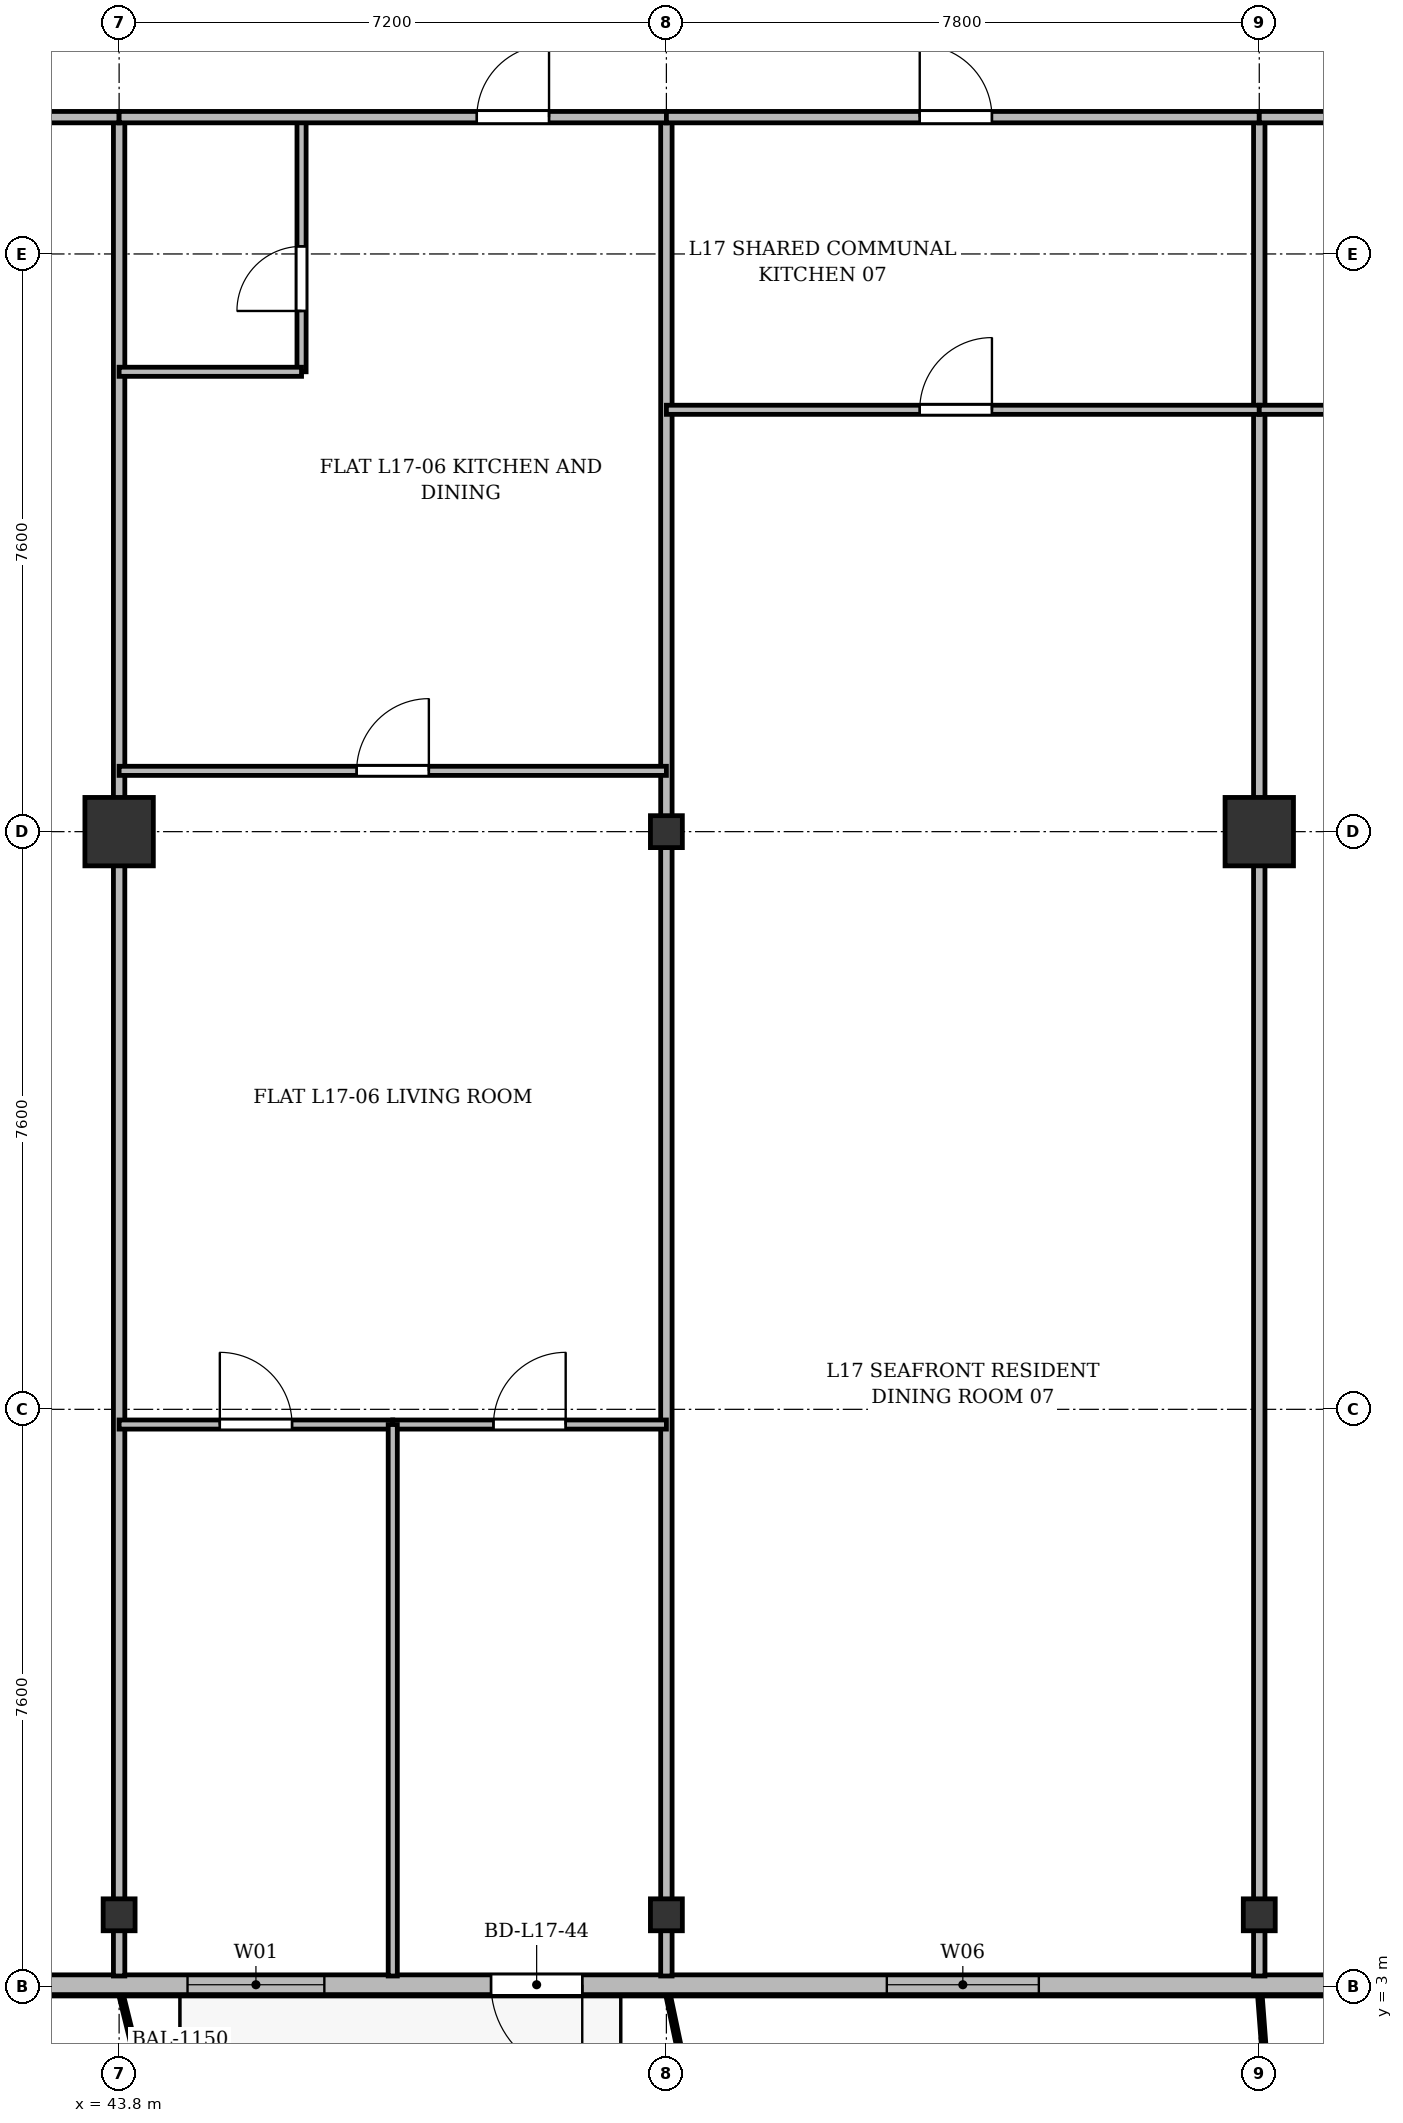
"""IFC4 building model, lengths in metres.
Left out: names, types, materials, properties, quantities, classifications, styles, units other than length and angle.
Written with IfcOpenShell. Run it as: python <this file> out.ifc"""

import sys

from ifc_helpers import new_model, si_unit, direction, frame, frame_2d, origin, origin_2d, place, context, subcontext, project, spatial, rectangle, i_section, extrude, source, transform, mapped, element, fill, save


model = new_model("IFC4")
c1 = context("Model", 3, precision=1e-05, world=origin(), true_north=direction((0.0, 1.0)))
c2 = subcontext(c1, "Body", "Model", "MODEL_VIEW")
j1 = project(units=[si_unit("LENGTHUNIT", "METRE"), si_unit("PLANEANGLEUNIT", "RADIAN")], contexts=[c1])
p1 = place(None, origin())
s1 = spatial("IfcSite", under=j1, at=p1, CompositionType="ELEMENT")
p2 = place(p1, origin())
s2 = spatial("IfcBuilding", under=s1, at=p2, CompositionType="ELEMENT")
p3 = place(p2, frame((0.0, 0.0, 66.7)))
s3 = spatial("IfcBuildingStorey", under=s2, at=p3, CompositionType="ELEMENT", Elevation=66.7)
m1 = source(origin(), c2, "Body", "SweptSolid", [
    extrude(i_section(OverallWidth=0.42, OverallDepth=0.42, WebThickness=0.026, FlangeThickness=0.04, at=origin_2d()), origin(), (0.0, 0.0, 1.0), 3.6),
])
p4 = place(p3, frame((43.8, 3.95, 0.0), z_axis=(0.0, 0.0, 1.0), x_axis=(1.0, 0.0, 0.0)))
e1 = element("IfcColumn", 1, at=p4, inside=s3, PredefinedType="COLUMN", context=c2, shape_type="MappedRepresentation", body=[
    mapped(m1, transform((0.0, 0.0, 0.0), x_axis=(1.0, 0.0, 0.0), y_axis=(0.0, 1.0, 0.0), z_axis=(0.0, 0.0, 1.0), scale=1.0)),
])
m2 = source(origin(), c2, "Body", "SweptSolid", [
    extrude(rectangle(XDim=0.9, YDim=0.9, at=origin_2d()), origin(), (0.0, 0.0, 1.0), 3.6),
])
p5 = place(p3, frame((43.8, 18.2, 0.0), z_axis=(0.0, 0.0, 1.0), x_axis=(1.0, 0.0, 0.0)))
e2 = element("IfcColumn", 2, at=p5, inside=s3, PredefinedType="COLUMN", context=c2, shape_type="MappedRepresentation", body=[
    mapped(m2, transform((0.0, 0.0, 0.0), x_axis=(1.0, 0.0, 0.0), y_axis=(0.0, 1.0, 0.0), z_axis=(0.0, 0.0, 1.0), scale=1.0)),
])
for number, where, z_axis, x_axis in (
    (3, (51.0, 3.95, 0.0), (0.0, 0.0, 1.0), (1.0, 0.0, 0.0)),
    (4, (51.0, 18.2, 0.0), (0.0, 0.0, 1.0), (1.0, 0.0, 0.0)),
    (5, (58.8, 3.95, 0.0), (0.0, 0.0, 1.0), (1.0, 0.0, 0.0)),
):
    element("IfcColumn", number, at=place(p3, frame(where, z_axis=z_axis, x_axis=x_axis)), inside=s3, PredefinedType="COLUMN", context=c2, shape_type="MappedRepresentation", body=[
        mapped(m1, transform((0.0, 0.0, 0.0), x_axis=(1.0, 0.0, 0.0), y_axis=(0.0, 1.0, 0.0), z_axis=(0.0, 0.0, 1.0), scale=1.0)),
    ])
p6 = place(p3, frame((58.8, 18.2, 0.0), z_axis=(0.0, 0.0, 1.0), x_axis=(1.0, 0.0, 0.0)))
e6 = element("IfcColumn", 6, at=p6, inside=s3, PredefinedType="COLUMN", context=c2, shape_type="MappedRepresentation", body=[
    mapped(m2, transform((0.0, 0.0, 0.0), x_axis=(1.0, 0.0, 0.0), y_axis=(0.0, 1.0, 0.0), z_axis=(0.0, 0.0, 1.0), scale=1.0)),
])
p7 = place(p3, frame((66.9, 3.03, 0.0), z_axis=(0.0, 0.0, 1.0), x_axis=(-1.0, 0.0, 0.0)))
e7 = element("IfcWall", 7, at=p7, inside=s3, PredefinedType="SOLIDWALL", context=c2, shape_type="SweptSolid", body=[
    extrude(rectangle(XDim=37.3, YDim=0.26, at=frame_2d((18.65, 0.0))), origin(), (0.0, 0.0, 1.0), 3.34),
])
p8 = place(p7, frame((3.345, 0.0, 0.9)))
e8 = element("IfcOpeningElement", 8, at=p8, cuts=e7, PredefinedType="OPENING", context=c2, shape_type="SweptSolid", body=[
    extrude(rectangle(XDim=1.5, YDim=1.75, at=frame_2d((0.75, 0.875))), frame((0.0, 0.14, 0.0), z_axis=(0.0, -1.0, 0.0), x_axis=(1.0, 0.0, 0.0)), (0.0, 0.0, 1.0), 0.28),
])
p9 = place(p7, frame((11.0, 0.0, 0.9)))
e9 = element("IfcOpeningElement", 9, at=p9, cuts=e7, PredefinedType="OPENING", context=c2, shape_type="SweptSolid", body=[
    extrude(rectangle(XDim=2.0, YDim=1.95, at=frame_2d((1.0, 0.975))), frame((0.0, 0.14, 0.0), z_axis=(0.0, -1.0, 0.0), x_axis=(1.0, 0.0, 0.0)), (0.0, 0.0, 1.0), 0.28),
])
p10 = place(p7, frame((17.007, 0.0, 0.0)))
e10 = element("IfcOpeningElement", 10, at=p10, cuts=e7, PredefinedType="OPENING", context=c2, shape_type="SweptSolid", body=[
    extrude(rectangle(XDim=1.2, YDim=2.2, at=frame_2d((0.6, 1.1))), frame((0.0, 0.14, 0.0), z_axis=(0.0, -1.0, 0.0), x_axis=(1.0, 0.0, 0.0)), (0.0, 0.0, 1.0), 0.28),
])
p11 = place(p7, frame((20.4, 0.0, 0.9)))
e11 = element("IfcOpeningElement", 11, at=p11, cuts=e7, PredefinedType="OPENING", context=c2, shape_type="SweptSolid", body=[
    extrude(rectangle(XDim=1.8, YDim=1.8, at=frame_2d((0.9, 0.9))), frame((0.0, 0.14, 0.0), z_axis=(0.0, -1.0, 0.0), x_axis=(1.0, 0.0, 0.0)), (0.0, 0.0, 1.0), 0.28),
])
p12 = place(p7, frame((28.6, 0.0, 0.9)))
e12 = element("IfcOpeningElement", 12, at=p12, cuts=e7, PredefinedType="OPENING", context=c2, shape_type="SweptSolid", body=[
    extrude(rectangle(XDim=2.2, YDim=1.8, at=frame_2d((1.1, 0.9))), frame((0.0, 0.14, 0.0), z_axis=(0.0, -1.0, 0.0), x_axis=(1.0, 0.0, 0.0)), (0.0, 0.0, 1.0), 0.28),
])
for number, where, z_axis, x_axis in (
    (13, (43.8, 3.145, 0.0), (0.0, 0.0, 1.0), (0.0, 1.0, 0.0)),
    (14, (51.0, 3.145, 0.0), (0.0, 0.0, 1.0), (0.0, 1.0, 0.0)),
    (15, (58.8, 3.145, 0.0), (0.0, 0.0, 1.0), (0.0, 1.0, 0.0)),
):
    element("IfcWall", number, at=place(p3, frame(where, z_axis=z_axis, x_axis=x_axis)), inside=s3, PredefinedType="PARTITIONING", context=c2, shape_type="SweptSolid", body=[
        extrude(rectangle(XDim=24.455, YDim=0.15, at=frame_2d((12.228, 0.0))), origin(), (0.0, 0.0, 1.0), 2.752),
    ])
p13 = place(p3, frame((30.6, 27.6, 0.0), z_axis=(0.0, 0.0, 1.0), x_axis=(1.0, 0.0, 0.0)))
e16 = element("IfcWall", 16, at=p13, inside=s3, PredefinedType="PARTITIONING", context=c2, shape_type="SweptSolid", body=[
    extrude(rectangle(XDim=13.2, YDim=0.15, at=frame_2d((6.6, 0.0))), origin(), (0.0, 0.0, 1.0), 2.752),
])
p14 = place(p13, frame((5.8, 0.0, 0.0)))
e17 = element("IfcOpeningElement", 17, at=p14, cuts=e16, PredefinedType="OPENING", context=c2, shape_type="SweptSolid", body=[
    extrude(rectangle(XDim=1.6, YDim=2.2, at=frame_2d((0.8, 1.1))), frame((0.0, 0.085, 0.0), z_axis=(0.0, -1.0, 0.0), x_axis=(1.0, 0.0, 0.0)), (0.0, 0.0, 1.0), 0.17),
])
p15 = place(p3, frame((43.8, 19.0, 0.0), z_axis=(0.0, 0.0, 1.0), x_axis=(1.0, 0.0, 0.0)))
e18 = element("IfcWall", 18, at=p15, inside=s3, PredefinedType="PARTITIONING", context=c2, shape_type="SweptSolid", body=[
    extrude(rectangle(XDim=7.2, YDim=0.12, at=frame_2d((3.6, 0.0))), origin(), (0.0, 0.0, 1.0), 2.752),
])
p16 = place(p15, frame((3.125, 0.0, 0.0)))
e19 = element("IfcOpeningElement", 19, at=p16, cuts=e18, PredefinedType="OPENING", context=c2, shape_type="SweptSolid", body=[
    extrude(rectangle(XDim=0.95, YDim=2.15, at=frame_2d((0.475, 1.075))), frame((0.0, 0.07, 0.0), z_axis=(0.0, -1.0, 0.0), x_axis=(1.0, 0.0, 0.0)), (0.0, 0.0, 1.0), 0.14),
])
p17 = place(p3, frame((46.2, 24.25, 0.0), z_axis=(0.0, 0.0, 1.0), x_axis=(0.0, 1.0, 0.0)))
e20 = element("IfcWall", 20, at=p17, inside=s3, PredefinedType="PARTITIONING", context=c2, shape_type="SweptSolid", body=[
    extrude(rectangle(XDim=3.35, YDim=0.12, at=frame_2d((1.675, 0.0))), origin(), (0.0, 0.0, 1.0), 2.94),
])
p18 = place(p17, frame((0.8, 0.0, 0.0)))
e21 = element("IfcOpeningElement", 21, at=p18, cuts=e20, PredefinedType="OPENING", context=c2, shape_type="SweptSolid", body=[
    extrude(rectangle(XDim=0.85, YDim=2.1, at=frame_2d((0.425, 1.05))), frame((0.0, 0.07, 0.0), z_axis=(0.0, -1.0, 0.0), x_axis=(1.0, 0.0, 0.0)), (0.0, 0.0, 1.0), 0.14),
])
p19 = place(p3, frame((43.8, 24.25, 0.0), z_axis=(0.0, 0.0, 1.0), x_axis=(1.0, 0.0, 0.0)))
e22 = element("IfcWall", 22, at=p19, inside=s3, PredefinedType="PARTITIONING", context=c2, shape_type="SweptSolid", body=[
    extrude(rectangle(XDim=2.4, YDim=0.12, at=frame_2d((1.2, 0.0))), origin(), (0.0, 0.0, 1.0), 2.752),
])
p20 = place(p3, frame((43.8, 27.6, 0.0), z_axis=(0.0, 0.0, 1.0), x_axis=(1.0, 0.0, 0.0)))
e23 = element("IfcWall", 23, at=p20, inside=s3, PredefinedType="PARTITIONING", context=c2, shape_type="SweptSolid", body=[
    extrude(rectangle(XDim=7.2, YDim=0.15, at=frame_2d((3.6, 0.0))), origin(), (0.0, 0.0, 1.0), 2.752),
])
p21 = place(p20, frame((4.706, 0.0, 0.0)))
e24 = element("IfcOpeningElement", 24, at=p21, cuts=e23, PredefinedType="OPENING", context=c2, shape_type="SweptSolid", body=[
    extrude(rectangle(XDim=0.95, YDim=2.15, at=frame_2d((0.475, 1.075))), frame((0.0, 0.085, 0.0), z_axis=(0.0, -1.0, 0.0), x_axis=(1.0, 0.0, 0.0)), (0.0, 0.0, 1.0), 0.17),
])
p22 = place(p3, frame((43.8, 10.4, 0.0), z_axis=(0.0, 0.0, 1.0), x_axis=(1.0, 0.0, 0.0)))
e25 = element("IfcWall", 25, at=p22, inside=s3, PredefinedType="PARTITIONING", context=c2, shape_type="SweptSolid", body=[
    extrude(rectangle(XDim=3.6, YDim=0.12, at=frame_2d((1.8, 0.0))), origin(), (0.0, 0.0, 1.0), 2.752),
])
p23 = place(p22, frame((1.325, 0.0, 0.0)))
e26 = element("IfcOpeningElement", 26, at=p23, cuts=e25, PredefinedType="OPENING", context=c2, shape_type="SweptSolid", body=[
    extrude(rectangle(XDim=0.95, YDim=2.15, at=frame_2d((0.475, 1.075))), frame((0.0, 0.07, 0.0), z_axis=(0.0, -1.0, 0.0), x_axis=(1.0, 0.0, 0.0)), (0.0, 0.0, 1.0), 0.14),
])
p24 = place(p3, frame((47.4, 10.4, 0.0), z_axis=(0.0, 0.0, 1.0), x_axis=(1.0, 0.0, 0.0)))
e27 = element("IfcWall", 27, at=p24, inside=s3, PredefinedType="PARTITIONING", context=c2, shape_type="SweptSolid", body=[
    extrude(rectangle(XDim=3.6, YDim=0.12, at=frame_2d((1.8, 0.0))), origin(), (0.0, 0.0, 1.0), 2.752),
])
p25 = place(p24, frame((1.325, 0.0, 0.0)))
e28 = element("IfcOpeningElement", 28, at=p25, cuts=e27, PredefinedType="OPENING", context=c2, shape_type="SweptSolid", body=[
    extrude(rectangle(XDim=0.95, YDim=2.15, at=frame_2d((0.475, 1.075))), frame((0.0, 0.07, 0.0), z_axis=(0.0, -1.0, 0.0), x_axis=(1.0, 0.0, 0.0)), (0.0, 0.0, 1.0), 0.14),
])
p26 = place(p3, frame((47.4, 3.145, 0.0), z_axis=(0.0, 0.0, 1.0), x_axis=(0.0, 1.0, 0.0)))
e29 = element("IfcWall", 29, at=p26, inside=s3, PredefinedType="PARTITIONING", context=c2, shape_type="SweptSolid", body=[
    extrude(rectangle(XDim=7.255, YDim=0.12, at=frame_2d((3.627, 0.0))), origin(), (0.0, 0.0, 1.0), 2.69),
])
p27 = place(p3, frame((51.0, 27.6, 0.0), z_axis=(0.0, 0.0, 1.0), x_axis=(1.0, 0.0, 0.0)))
e30 = element("IfcWall", 30, at=p27, inside=s3, PredefinedType="PARTITIONING", context=c2, shape_type="SweptSolid", body=[
    extrude(rectangle(XDim=7.8, YDim=0.15, at=frame_2d((3.9, 0.0))), origin(), (0.0, 0.0, 1.0), 2.752),
])
p28 = place(p27, frame((3.333, 0.0, 0.0)))
e31 = element("IfcOpeningElement", 31, at=p28, cuts=e30, PredefinedType="OPENING", context=c2, shape_type="SweptSolid", body=[
    extrude(rectangle(XDim=0.95, YDim=2.15, at=frame_2d((0.475, 1.075))), frame((0.0, 0.085, 0.0), z_axis=(0.0, -1.0, 0.0), x_axis=(1.0, 0.0, 0.0)), (0.0, 0.0, 1.0), 0.17),
])
p29 = place(p3, frame((51.0, 23.75, 0.0), z_axis=(0.0, 0.0, 1.0), x_axis=(1.0, 0.0, 0.0)))
e32 = element("IfcWall", 32, at=p29, inside=s3, PredefinedType="PARTITIONING", context=c2, shape_type="SweptSolid", body=[
    extrude(rectangle(XDim=7.8, YDim=0.12, at=frame_2d((3.9, 0.0))), origin(), (0.0, 0.0, 1.0), 2.752),
])
p30 = place(p29, frame((3.333, 0.0, 0.0)))
e33 = element("IfcOpeningElement", 33, at=p30, cuts=e32, PredefinedType="OPENING", context=c2, shape_type="SweptSolid", body=[
    extrude(rectangle(XDim=0.95, YDim=2.15, at=frame_2d((0.475, 1.075))), frame((0.0, 0.07, 0.0), z_axis=(0.0, -1.0, 0.0), x_axis=(1.0, 0.0, 0.0)), (0.0, 0.0, 1.0), 0.14),
])
p31 = place(p3, frame((58.8, 27.6, 0.0), z_axis=(0.0, 0.0, 1.0), x_axis=(1.0, 0.0, 0.0)))
e34 = element("IfcWall", 34, at=p31, inside=s3, PredefinedType="PARTITIONING", context=c2, shape_type="SweptSolid", body=[
    extrude(rectangle(XDim=10.855, YDim=0.15, at=frame_2d((5.427, 0.0))), origin(), (0.0, 0.0, 1.0), 2.752),
])
p32 = place(p31, frame((4.953, 0.0, 0.0)))
e35 = element("IfcOpeningElement", 35, at=p32, cuts=e34, PredefinedType="OPENING", context=c2, shape_type="SweptSolid", body=[
    extrude(rectangle(XDim=0.95, YDim=2.15, at=frame_2d((0.475, 1.075))), frame((0.0, 0.085, 0.0), z_axis=(0.0, -1.0, 0.0), x_axis=(1.0, 0.0, 0.0)), (0.0, 0.0, 1.0), 0.17),
])
p33 = place(p3, frame((58.8, 23.75, 0.0), z_axis=(0.0, 0.0, 1.0), x_axis=(1.0, 0.0, 0.0)))
e36 = element("IfcWall", 36, at=p33, inside=s3, PredefinedType="PARTITIONING", context=c2, shape_type="SweptSolid", body=[
    extrude(rectangle(XDim=10.855, YDim=0.12, at=frame_2d((5.427, 0.0))), origin(), (0.0, 0.0, 1.0), 2.752),
])
p34 = place(p33, frame((4.953, 0.0, 0.0)))
e37 = element("IfcOpeningElement", 37, at=p34, cuts=e36, PredefinedType="OPENING", context=c2, shape_type="SweptSolid", body=[
    extrude(rectangle(XDim=0.95, YDim=2.15, at=frame_2d((0.475, 1.075))), frame((0.0, 0.07, 0.0), z_axis=(0.0, -1.0, 0.0), x_axis=(1.0, 0.0, 0.0)), (0.0, 0.0, 1.0), 0.14),
])
m3 = source(origin(), c2, "Body", "SweptSolid", [
    extrude(rectangle(XDim=2.0, YDim=1.95, at=frame_2d((1.0, 0.975))), frame((0.0, 0.03, 0.0), z_axis=(0.0, -1.0, 0.0), x_axis=(1.0, 0.0, 0.0)), (0.0, 0.0, 1.0), 0.06),
])
p35 = place(p9, origin())
e38 = element("IfcWindow", 38, at=p35, inside=s3, PartitioningType="SINGLE_PANEL", PredefinedType="WINDOW", context=c2, shape_type="MappedRepresentation", body=[
    mapped(m3, transform((0.0, 0.0, 0.0), x_axis=(1.0, 0.0, 0.0), y_axis=(0.0, 1.0, 0.0), z_axis=(0.0, 0.0, 1.0), scale=1.0)),
])
fill(e9, e38)
m4 = source(origin(), c2, "Body", "SweptSolid", [
    extrude(rectangle(XDim=1.2, YDim=2.2, at=frame_2d((0.6, 1.1))), frame((0.0, 0.025, 0.0), z_axis=(0.0, -1.0, 0.0), x_axis=(1.0, 0.0, 0.0)), (0.0, 0.0, 1.0), 0.05),
])
p36 = place(p10, origin())
e39 = element("IfcDoor", 39, at=p36, inside=s3, OperationType="SINGLE_SWING_LEFT", PredefinedType="DOOR", context=c2, shape_type="MappedRepresentation", body=[
    mapped(m4, transform((0.0, 0.0, 0.0), x_axis=(1.0, 0.0, 0.0), y_axis=(0.0, 1.0, 0.0), z_axis=(0.0, 0.0, 1.0), scale=1.0)),
])
fill(e10, e39)
m5 = source(origin(), c2, "Body", "SweptSolid", [
    extrude(rectangle(XDim=1.8, YDim=1.8, at=frame_2d((0.9, 0.9))), frame((0.0, 0.03, 0.0), z_axis=(0.0, -1.0, 0.0), x_axis=(1.0, 0.0, 0.0)), (0.0, 0.0, 1.0), 0.06),
])
p37 = place(p11, origin())
e40 = element("IfcWindow", 40, at=p37, inside=s3, PartitioningType="SINGLE_PANEL", PredefinedType="WINDOW", context=c2, shape_type="MappedRepresentation", body=[
    mapped(m5, transform((0.0, 0.0, 0.0), x_axis=(1.0, 0.0, 0.0), y_axis=(0.0, 1.0, 0.0), z_axis=(0.0, 0.0, 1.0), scale=1.0)),
])
fill(e11, e40)
m6 = source(origin(), c2, "Body", "SweptSolid", [
    extrude(rectangle(XDim=0.95, YDim=2.15, at=frame_2d((0.475, 1.075))), frame((0.0, 0.025, 0.0), z_axis=(0.0, -1.0, 0.0), x_axis=(1.0, 0.0, 0.0)), (0.0, 0.0, 1.0), 0.05),
])
p38 = place(p16, origin())
e41 = element("IfcDoor", 41, at=p38, inside=s3, OperationType="SINGLE_SWING_RIGHT", PredefinedType="DOOR", context=c2, shape_type="MappedRepresentation", body=[
    mapped(m6, transform((0.0, 0.0, 0.0), x_axis=(1.0, 0.0, 0.0), y_axis=(0.0, 1.0, 0.0), z_axis=(0.0, 0.0, 1.0), scale=1.0)),
])
fill(e19, e41)
m7 = source(origin(), c2, "Body", "SweptSolid", [
    extrude(rectangle(XDim=0.85, YDim=2.1, at=frame_2d((0.425, 1.05))), frame((0.0, 0.025, 0.0), z_axis=(0.0, -1.0, 0.0), x_axis=(1.0, 0.0, 0.0)), (0.0, 0.0, 1.0), 0.05),
])
p39 = place(p18, origin())
e42 = element("IfcDoor", 42, at=p39, inside=s3, OperationType="SINGLE_SWING_LEFT", PredefinedType="DOOR", context=c2, shape_type="MappedRepresentation", body=[
    mapped(m7, transform((0.0, 0.0, 0.0), x_axis=(1.0, 0.0, 0.0), y_axis=(0.0, 1.0, 0.0), z_axis=(0.0, 0.0, 1.0), scale=1.0)),
])
fill(e21, e42)
p40 = place(p21, origin())
e43 = element("IfcDoor", 43, at=p40, inside=s3, OperationType="SINGLE_SWING_RIGHT", PredefinedType="DOOR", context=c2, shape_type="MappedRepresentation", body=[
    mapped(m6, transform((0.0, 0.0, 0.0), x_axis=(1.0, 0.0, 0.0), y_axis=(0.0, 1.0, 0.0), z_axis=(0.0, 0.0, 1.0), scale=1.0)),
])
fill(e24, e43)
p41 = place(p23, origin())
e44 = element("IfcDoor", 44, at=p41, inside=s3, OperationType="SINGLE_SWING_LEFT", PredefinedType="DOOR", context=c2, shape_type="MappedRepresentation", body=[
    mapped(m6, transform((0.0, 0.0, 0.0), x_axis=(1.0, 0.0, 0.0), y_axis=(0.0, 1.0, 0.0), z_axis=(0.0, 0.0, 1.0), scale=1.0)),
])
fill(e26, e44)
p42 = place(p25, origin())
e45 = element("IfcDoor", 45, at=p42, inside=s3, OperationType="SINGLE_SWING_RIGHT", PredefinedType="DOOR", context=c2, shape_type="MappedRepresentation", body=[
    mapped(m6, transform((0.0, 0.0, 0.0), x_axis=(1.0, 0.0, 0.0), y_axis=(0.0, 1.0, 0.0), z_axis=(0.0, 0.0, 1.0), scale=1.0)),
])
fill(e28, e45)
p43 = place(p28, origin())
e46 = element("IfcDoor", 46, at=p43, inside=s3, OperationType="SINGLE_SWING_LEFT", PredefinedType="DOOR", context=c2, shape_type="MappedRepresentation", body=[
    mapped(m6, transform((0.0, 0.0, 0.0), x_axis=(1.0, 0.0, 0.0), y_axis=(0.0, 1.0, 0.0), z_axis=(0.0, 0.0, 1.0), scale=1.0)),
])
fill(e31, e46)
p44 = place(p30, origin())
e47 = element("IfcDoor", 47, at=p44, inside=s3, OperationType="SINGLE_SWING_RIGHT", PredefinedType="DOOR", context=c2, shape_type="MappedRepresentation", body=[
    mapped(m6, transform((0.0, 0.0, 0.0), x_axis=(1.0, 0.0, 0.0), y_axis=(0.0, 1.0, 0.0), z_axis=(0.0, 0.0, 1.0), scale=1.0)),
])
fill(e33, e47)
save(model, sys.argv[1])
